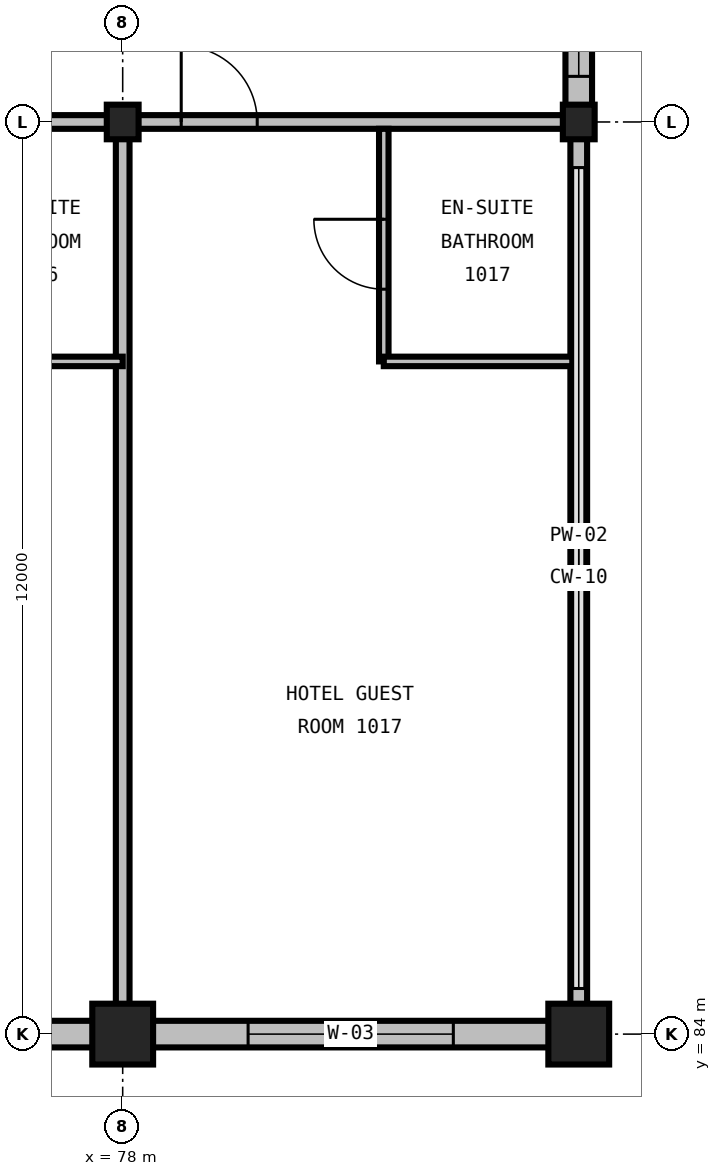
"""IFC4 building model, lengths in metres.
Left out: names, types, materials, properties, quantities, classifications, styles, units other than length and angle.
Written with IfcOpenShell. Run it as: python <this file> out.ifc"""

import sys

from ifc_helpers import new_model, si_unit, direction, frame, frame_2d, origin, origin_2d, place, context, subcontext, project, spatial, rectangle, i_section, extrude, element, fill, save


model = new_model("IFC4")
c1 = context("Model", 3, precision=1e-05, world=origin(), true_north=direction((0.0, 1.0)))
c2 = subcontext(c1, "Body", "Model", "MODEL_VIEW")
j1 = project(units=[si_unit("LENGTHUNIT", "METRE"), si_unit("PLANEANGLEUNIT", "RADIAN")], contexts=[c1])
p1 = place(None, origin())
s1 = spatial("IfcSite", under=j1, at=p1, CompositionType="ELEMENT")
p2 = place(p1, origin())
s2 = spatial("IfcBuilding", under=s1, at=p2, CompositionType="ELEMENT")
p3 = place(p2, frame((0.0, 0.0, 45.6)))
s3 = spatial("IfcBuildingStorey", under=s2, at=p3, CompositionType="ELEMENT", Elevation=45.6)
p4 = place(p3, frame((78.0, 84.0, 0.0), z_axis=(0.0, 0.0, 1.0), x_axis=(1.0, 0.0, 0.0)))
e1 = element("IfcColumn", 1, at=p4, inside=s3, PredefinedType="COLUMN", context=c2, shape_type="SweptSolid", body=[
    extrude(rectangle(XDim=0.8, YDim=0.8, at=origin_2d()), origin(), (0.0, 0.0, 1.0), 3.6),
])
p5 = place(p3, frame((78.0, 96.0, 0.0), z_axis=(0.0, 0.0, 1.0), x_axis=(1.0, 0.0, 0.0)))
e2 = element("IfcColumn", 2, at=p5, inside=s3, PredefinedType="COLUMN", context=c2, shape_type="SweptSolid", body=[
    extrude(i_section(OverallWidth=0.419, OverallDepth=0.455, WebThickness=0.042, FlangeThickness=0.068, FilletRadius=0.031, at=origin_2d()), origin(), (0.0, 0.0, 1.0), 3.6),
])
p6 = place(p3, frame((84.0, 84.0, 0.0), z_axis=(0.0, 0.0, 1.0), x_axis=(1.0, 0.0, 0.0)))
e3 = element("IfcColumn", 3, at=p6, inside=s3, PredefinedType="COLUMN", context=c2, shape_type="SweptSolid", body=[
    extrude(rectangle(XDim=0.8, YDim=0.8, at=origin_2d()), origin(), (0.0, 0.0, 1.0), 3.6),
])
p7 = place(p3, frame((84.0, 96.0, 0.0), z_axis=(0.0, 0.0, 1.0), x_axis=(1.0, 0.0, 0.0)))
e4 = element("IfcColumn", 4, at=p7, inside=s3, PredefinedType="COLUMN", context=c2, shape_type="SweptSolid", body=[
    extrude(i_section(OverallWidth=0.419, OverallDepth=0.455, WebThickness=0.042, FlangeThickness=0.068, FilletRadius=0.031, at=origin_2d()), origin(), (0.0, 0.0, 1.0), 3.6),
])
p8 = place(p3, frame((66.0, 84.0, 0.0), z_axis=(0.0, 0.0, 1.0), x_axis=(1.0, 0.0, 0.0)))
e5 = element("IfcWall", 5, at=p8, inside=s3, PredefinedType="STANDARD", context=c2, shape_type="SweptSolid", body=[
    extrude(rectangle(XDim=12.0, YDim=0.35, at=frame_2d((6.0, 0.0))), origin(), (0.0, 0.0, 1.0), 2.486),
])
p9 = place(p8, frame((1.65, 0.0, 0.72)))
e6 = element("IfcOpeningElement", 6, at=p9, cuts=e5, PredefinedType="OPENING", context=c2, shape_type="SweptSolid", body=[
    extrude(rectangle(XDim=2.7, YDim=1.65, at=frame_2d((1.35, 0.825))), frame((0.0, 0.19, 0.0), z_axis=(0.0, -1.0, 0.0), x_axis=(1.0, 0.0, 0.0)), (0.0, 0.0, 1.0), 0.38),
])
p10 = place(p8, frame((7.65, 0.0, 0.72)))
e7 = element("IfcOpeningElement", 7, at=p10, cuts=e5, PredefinedType="OPENING", context=c2, shape_type="SweptSolid", body=[
    extrude(rectangle(XDim=2.7, YDim=1.65, at=frame_2d((1.35, 0.825))), frame((0.0, 0.19, 0.0), z_axis=(0.0, -1.0, 0.0), x_axis=(1.0, 0.0, 0.0)), (0.0, 0.0, 1.0), 0.38),
])
p11 = place(p3, frame((78.0, 84.0, 0.0), z_axis=(0.0, 0.0, 1.0), x_axis=(1.0, 0.0, 0.0)))
e8 = element("IfcWall", 8, at=p11, inside=s3, PredefinedType="STANDARD", context=c2, shape_type="SweptSolid", body=[
    extrude(rectangle(XDim=6.0, YDim=0.35, at=frame_2d((3.0, 0.0))), origin(), (0.0, 0.0, 1.0), 2.486),
])
p12 = place(p11, frame((1.65, 0.0, 0.72)))
e9 = element("IfcOpeningElement", 9, at=p12, cuts=e8, PredefinedType="OPENING", context=c2, shape_type="SweptSolid", body=[
    extrude(rectangle(XDim=2.7, YDim=1.65, at=frame_2d((1.35, 0.825))), frame((0.0, 0.19, 0.0), z_axis=(0.0, -1.0, 0.0), x_axis=(1.0, 0.0, 0.0)), (0.0, 0.0, 1.0), 0.38),
])
p13 = place(p3, frame((84.0, 84.0, 0.0), z_axis=(0.0, 0.0, 1.0), x_axis=(0.0, 1.0, 0.0)))
e10 = element("IfcWall", 10, at=p13, inside=s3, PredefinedType="PARAPET", context=c2, shape_type="SweptSolid", body=[
    extrude(rectangle(XDim=12.0, YDim=0.22, at=frame_2d((6.0, 0.0))), origin(), (0.0, 0.0, 1.0), 0.2),
])
p14 = place(p3, frame((84.0, 96.0, 0.0), z_axis=(0.0, 0.0, 1.0), x_axis=(0.0, 1.0, 0.0)))
e11 = element("IfcWall", 11, at=p14, inside=s3, PredefinedType="STANDARD", context=c2, shape_type="SweptSolid", body=[
    extrude(rectangle(XDim=9.0, YDim=0.35, at=frame_2d((4.5, 0.0))), origin(), (0.0, 0.0, 1.0), 2.981),
])
p15 = place(p14, frame((0.6, 0.0, 0.85)))
e12 = element("IfcOpeningElement", 12, at=p15, cuts=e11, PredefinedType="OPENING", context=c2, shape_type="SweptSolid", body=[
    extrude(rectangle(XDim=1.8, YDim=1.5, at=frame_2d((0.9, 0.75))), frame((0.0, 0.19, 0.0), z_axis=(0.0, -1.0, 0.0), x_axis=(1.0, 0.0, 0.0)), (0.0, 0.0, 1.0), 0.38),
])
p16 = place(p3, frame((72.0, 96.0, 0.0), z_axis=(0.0, 0.0, 1.0), x_axis=(1.0, 0.0, 0.0)))
e13 = element("IfcWall", 13, at=p16, inside=s3, PredefinedType="PARTITIONING", context=c2, shape_type="SweptSolid", body=[
    extrude(rectangle(XDim=6.0, YDim=0.18, at=frame_2d((3.0, 0.0))), origin(), (0.0, 0.0, 1.0), 2.664),
])
p17 = place(p16, frame((0.55, 0.0, 0.0)))
e14 = element("IfcOpeningElement", 14, at=p17, cuts=e13, PredefinedType="OPENING", context=c2, shape_type="SweptSolid", body=[
    extrude(rectangle(XDim=1.0, YDim=2.15, at=frame_2d((0.5, 1.075))), frame((0.0, 0.105, 0.0), z_axis=(0.0, -1.0, 0.0), x_axis=(1.0, 0.0, 0.0)), (0.0, 0.0, 1.0), 0.21),
])
p18 = place(p3, frame((78.0, 84.175, 0.0), z_axis=(0.0, 0.0, 1.0), x_axis=(0.0, 1.0, 0.0)))
e15 = element("IfcWall", 15, at=p18, inside=s3, PredefinedType="PARTITIONING", context=c2, shape_type="SweptSolid", body=[
    extrude(rectangle(XDim=11.825, YDim=0.18, at=frame_2d((5.913, 0.0))), origin(), (0.0, 0.0, 1.0), 2.59),
])
p19 = place(p3, frame((75.48, 92.85, 0.0), z_axis=(0.0, 0.0, 1.0), x_axis=(1.0, 0.0, 0.0)))
e16 = element("IfcWall", 16, at=p19, inside=s3, PredefinedType="PARTITIONING", context=c2, shape_type="SweptSolid", body=[
    extrude(rectangle(XDim=2.52, YDim=0.125, at=frame_2d((1.26, 0.0))), origin(), (0.0, 0.0, 1.0), 3.29),
])
p20 = place(p3, frame((78.0, 96.0, 0.0), z_axis=(0.0, 0.0, 1.0), x_axis=(1.0, 0.0, 0.0)))
e17 = element("IfcWall", 17, at=p20, inside=s3, PredefinedType="PARTITIONING", context=c2, shape_type="SweptSolid", body=[
    extrude(rectangle(XDim=5.915, YDim=0.18, at=frame_2d((2.957, 0.0))), origin(), (0.0, 0.0, 1.0), 2.736),
])
p21 = place(p20, frame((0.77, 0.0, 0.0)))
e18 = element("IfcOpeningElement", 18, at=p21, cuts=e17, PredefinedType="OPENING", context=c2, shape_type="SweptSolid", body=[
    extrude(rectangle(XDim=1.0, YDim=2.15, at=frame_2d((0.5, 1.075))), frame((0.0, 0.105, 0.0), z_axis=(0.0, -1.0, 0.0), x_axis=(1.0, 0.0, 0.0)), (0.0, 0.0, 1.0), 0.21),
])
p22 = place(p3, frame((81.435, 92.85, 0.0), z_axis=(0.0, 0.0, 1.0), x_axis=(0.0, 1.0, 0.0)))
e19 = element("IfcWall", 19, at=p22, inside=s3, PredefinedType="PARTITIONING", context=c2, shape_type="SweptSolid", body=[
    extrude(rectangle(XDim=3.06, YDim=0.125, at=frame_2d((1.53, 0.0))), origin(), (0.0, 0.0, 1.0), 3.29),
])
p23 = place(p22, frame((0.95, 0.0, 0.0)))
e20 = element("IfcOpeningElement", 20, at=p23, cuts=e19, PredefinedType="OPENING", context=c2, shape_type="SweptSolid", body=[
    extrude(rectangle(XDim=0.92, YDim=2.1, at=frame_2d((0.46, 1.05))), frame((0.0, 0.077, 0.0), z_axis=(0.0, -1.0, 0.0), x_axis=(1.0, 0.0, 0.0)), (0.0, 0.0, 1.0), 0.155),
])
p24 = place(p3, frame((81.435, 92.85, 0.0), z_axis=(0.0, 0.0, 1.0), x_axis=(1.0, 0.0, 0.0)))
e21 = element("IfcWall", 21, at=p24, inside=s3, PredefinedType="PARTITIONING", context=c2, shape_type="SweptSolid", body=[
    extrude(rectangle(XDim=2.48, YDim=0.125, at=frame_2d((1.24, 0.0))), origin(), (0.0, 0.0, 1.0), 3.29),
])
p25 = place(p12, origin())
e22 = element("IfcWindow", 22, at=p25, inside=s3, PartitioningType="TRIPLE_PANEL_VERTICAL", PredefinedType="WINDOW", context=c2, shape_type="SweptSolid", body=[
    extrude(rectangle(XDim=2.7, YDim=1.65, at=frame_2d((1.35, 0.825))), frame((0.0, 0.03, 0.0), z_axis=(0.0, -1.0, 0.0), x_axis=(1.0, 0.0, 0.0)), (0.0, 0.0, 1.0), 0.06),
])
fill(e9, e22)
p26 = place(p15, origin())
e23 = element("IfcWindow", 23, at=p26, inside=s3, PartitioningType="SINGLE_PANEL", PredefinedType="WINDOW", context=c2, shape_type="SweptSolid", body=[
    extrude(rectangle(XDim=1.8, YDim=1.5, at=frame_2d((0.9, 0.75))), frame((0.0, 0.03, 0.0), z_axis=(0.0, -1.0, 0.0), x_axis=(1.0, 0.0, 0.0)), (0.0, 0.0, 1.0), 0.06),
])
fill(e12, e23)
p27 = place(p21, origin())
e24 = element("IfcDoor", 24, at=p27, inside=s3, OperationType="SINGLE_SWING_LEFT", PredefinedType="DOOR", context=c2, shape_type="SweptSolid", body=[
    extrude(rectangle(XDim=1.0, YDim=2.15, at=frame_2d((0.5, 1.075))), frame((0.0, 0.025, 0.0), z_axis=(0.0, -1.0, 0.0), x_axis=(1.0, 0.0, 0.0)), (0.0, 0.0, 1.0), 0.05),
])
fill(e18, e24)
p28 = place(p23, origin())
e25 = element("IfcDoor", 25, at=p28, inside=s3, OperationType="SINGLE_SWING_RIGHT", PredefinedType="DOOR", context=c2, shape_type="SweptSolid", body=[
    extrude(rectangle(XDim=0.92, YDim=2.1, at=frame_2d((0.46, 1.05))), frame((0.0, 0.025, 0.0), z_axis=(0.0, -1.0, 0.0), x_axis=(1.0, 0.0, 0.0)), (0.0, 0.0, 1.0), 0.05),
])
fill(e20, e25)
save(model, sys.argv[1])
